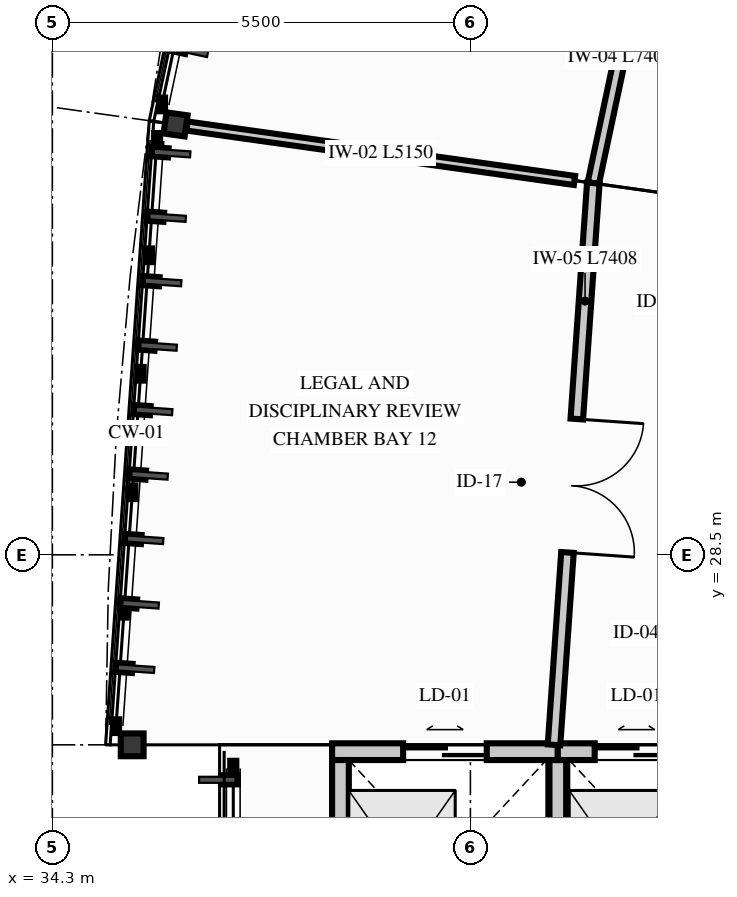
"""IFC4 building model, lengths in metres.
Left out: names, types, materials, properties, quantities, classifications, styles, units other than length and angle.
Written with IfcOpenShell. Run it as: python <this file> out.ifc"""

import sys

from ifc_helpers import new_model, si_unit, direction, frame, frame_2d, origin, origin_2d, place, context, subcontext, project, spatial, rectangle, i_section, extrude, element, fill, save


model = new_model("IFC4")
c1 = context("Model", 3, precision=1e-05, world=origin(), true_north=direction((0.0, 1.0)))
c2 = subcontext(c1, "Body", "Model", "MODEL_VIEW")
j1 = project(units=[si_unit("LENGTHUNIT", "METRE"), si_unit("PLANEANGLEUNIT", "RADIAN")], contexts=[c1])
p1 = place(None, origin())
s1 = spatial("IfcSite", under=j1, at=p1, CompositionType="ELEMENT")
p2 = place(p1, origin())
s2 = spatial("IfcBuilding", under=s1, at=p2, CompositionType="ELEMENT")
p3 = place(p2, frame((0.0, 0.0, 25.5)))
s3 = spatial("IfcBuildingStorey", under=s2, at=p3, CompositionType="ELEMENT", Elevation=25.5)
p4 = place(p3, frame((35.921, 34.163, 0.0), z_axis=(0.0, 0.0, 1.0), x_axis=(0.13917310096, 0.990268068742, 0.0)))
e1 = element("IfcColumn", 1, at=p4, inside=s3, PredefinedType="COLUMN", context=c2, shape_type="SweptSolid", body=[
    extrude(i_section(OverallWidth=0.28, OverallDepth=0.28, WebThickness=0.01, FlangeThickness=0.018, FilletRadius=0.024, at=origin_2d()), origin(), (0.0, 0.0, 1.0), 3.9),
])
p5 = place(p3, frame((35.35, 26.0, 0.0), z_axis=(0.0, 0.0, 1.0), x_axis=(0.0, 1.0, 0.0)))
e2 = element("IfcColumn", 2, at=p5, inside=s3, PredefinedType="COLUMN", context=c2, shape_type="SweptSolid", body=[
    extrude(i_section(OverallWidth=0.3, OverallDepth=0.3, WebThickness=0.011, FlangeThickness=0.019, FilletRadius=0.027, at=origin_2d()), origin(), (0.0, 0.0, 1.0), 3.9),
])
p6 = place(p3, frame((37.98, 25.91, 0.0), z_axis=(0.0, 0.0, 1.0), x_axis=(1.0, 0.0, 0.0)))
e3 = element("IfcWall", 3, at=p6, inside=s3, PredefinedType="PARTITIONING", context=c2, shape_type="SweptSolid", body=[
    extrude(rectangle(XDim=2.97, YDim=0.22, at=frame_2d((1.485, 0.0))), origin(), (0.0, 0.0, 1.0), 3.25),
])
p7 = place(p6, frame((0.935, 0.0, 0.0)))
e4 = element("IfcOpeningElement", 4, at=p7, cuts=e3, PredefinedType="OPENING", context=c2, shape_type="SweptSolid", body=[
    extrude(rectangle(XDim=1.1, YDim=2.15, at=frame_2d((0.55, 1.075))), frame((0.0, 0.12, 0.0), z_axis=(0.0, -1.0, 0.0), x_axis=(1.0, 0.0, 0.0)), (0.0, 0.0, 1.0), 0.24),
])
for number, where, z_axis, x_axis in (
    (5, (38.09, 23.16, 0.0), (0.0, 0.0, 1.0), (0.0, 1.0, 0.0)),
    (6, (40.95, 23.16, 0.0), (0.0, 0.0, 1.0), (0.0, 1.0, 0.0)),
):
    element("IfcWall", number, at=place(p3, frame(where, z_axis=z_axis, x_axis=x_axis)), inside=s3, PredefinedType="PARTITIONING", context=c2, shape_type="SweptSolid", body=[
        extrude(rectangle(XDim=2.64, YDim=0.22, at=frame_2d((1.32, 0.0))), origin(), (0.0, 0.0, 1.0), 3.68),
    ])
p8 = place(p3, frame((40.95, 25.91, 0.0), z_axis=(0.0, 0.0, 1.0), x_axis=(1.0, 0.0, 0.0)))
e7 = element("IfcWall", 7, at=p8, inside=s3, PredefinedType="PARTITIONING", context=c2, shape_type="SweptSolid", body=[
    extrude(rectangle(XDim=2.97, YDim=0.22, at=frame_2d((1.485, 0.0))), origin(), (0.0, 0.0, 1.0), 3.25),
])
p9 = place(p8, frame((0.485, 0.0, 0.0)))
e8 = element("IfcOpeningElement", 8, at=p9, cuts=e7, PredefinedType="OPENING", context=c2, shape_type="SweptSolid", body=[
    extrude(rectangle(XDim=1.1, YDim=2.15, at=frame_2d((0.55, 1.075))), frame((0.0, 0.12, 0.0), z_axis=(0.0, -1.0, 0.0), x_axis=(1.0, 0.0, 0.0)), (0.0, 0.0, 1.0), 0.24),
])
p10 = place(p3, frame((42.957, 40.636, 0.0), z_axis=(0.0, 0.0, 1.0), x_axis=(-0.207921820376, -0.978145447575, 0.0)))
e9 = element("IfcWall", 9, at=p10, inside=s3, PredefinedType="PARTITIONING", context=c2, shape_type="SweptSolid", body=[
    extrude(rectangle(XDim=7.408, YDim=0.15, at=frame_2d((3.704, 0.0))), origin(), (0.0, 0.0, 1.0), 3.68),
])
p11 = place(p10, frame((3.111, 0.0, 0.0)))
e10 = element("IfcOpeningElement", 10, at=p11, cuts=e9, PredefinedType="OPENING", context=c2, shape_type="SweptSolid", body=[
    extrude(rectangle(XDim=0.9, YDim=2.1, at=frame_2d((0.45, 1.05))), frame((0.0, 0.085, 0.0), z_axis=(0.0, -1.0, 0.0), x_axis=(1.0, 0.0, 0.0)), (0.0, 0.0, 1.0), 0.17),
])
p12 = place(p3, frame((41.169, 33.425, 0.0), z_axis=(0.0, 0.0, 1.0), x_axis=(-0.990266484291, 0.13918437445, 0.0)))
e11 = element("IfcWall", 11, at=p12, inside=s3, PredefinedType="PARTITIONING", context=c2, shape_type="SweptSolid", body=[
    extrude(rectangle(XDim=5.15, YDim=0.12, at=frame_2d((2.575, 0.0))), origin(), (0.0, 0.0, 1.0), 3.25),
])
p13 = place(p3, frame((41.417, 33.39, 0.0), z_axis=(0.0, 0.0, 1.0), x_axis=(-0.069766817412, -0.997563326906, 0.0)))
e12 = element("IfcWall", 12, at=p13, inside=s3, PredefinedType="PARTITIONING", context=c2, shape_type="SweptSolid", body=[
    extrude(rectangle(XDim=7.408, YDim=0.165, at=frame_2d((3.704, 0.0))), origin(), (0.0, 0.0, 1.0), 3.68),
])
p14 = place(p13, frame((3.111, 0.0, 0.0)))
e13 = element("IfcOpeningElement", 13, at=p14, cuts=e12, PredefinedType="OPENING", context=c2, shape_type="SweptSolid", body=[
    extrude(rectangle(XDim=1.76, YDim=2.36, at=frame_2d((0.88, 1.18))), frame((0.0, 0.093, 0.0), z_axis=(0.0, -1.0, 0.0), x_axis=(1.0, 0.0, 0.0)), (0.0, 0.0, 1.0), 0.185),
])
p15 = place(p7, origin())
e14 = element("IfcDoor", 14, at=p15, inside=s3, OperationType="DOUBLE_DOOR_SLIDING", PredefinedType="DOOR", context=c2, shape_type="SweptSolid", body=[
    extrude(rectangle(XDim=1.1, YDim=2.15, at=frame_2d((0.55, 1.075))), frame((0.0, 0.025, 0.0), z_axis=(0.0, -1.0, 0.0), x_axis=(1.0, 0.0, 0.0)), (0.0, 0.0, 1.0), 0.05),
])
fill(e4, e14)
p16 = place(p9, origin())
e15 = element("IfcDoor", 15, at=p16, inside=s3, OperationType="DOUBLE_DOOR_SLIDING", PredefinedType="DOOR", context=c2, shape_type="SweptSolid", body=[
    extrude(rectangle(XDim=1.1, YDim=2.15, at=frame_2d((0.55, 1.075))), frame((0.0, 0.025, 0.0), z_axis=(0.0, -1.0, 0.0), x_axis=(1.0, 0.0, 0.0)), (0.0, 0.0, 1.0), 0.05),
])
fill(e8, e15)
p17 = place(p14, origin())
e16 = element("IfcDoor", 16, at=p17, inside=s3, OperationType="DOUBLE_DOOR_SINGLE_SWING", PredefinedType="DOOR", context=c2, shape_type="SweptSolid", body=[
    extrude(rectangle(XDim=1.76, YDim=2.36, at=frame_2d((0.88, 1.18))), frame((0.0, 0.025, 0.0), z_axis=(0.0, -1.0, 0.0), x_axis=(1.0, 0.0, 0.0)), (0.0, 0.0, 1.0), 0.05),
])
fill(e13, e16)
save(model, sys.argv[1])
